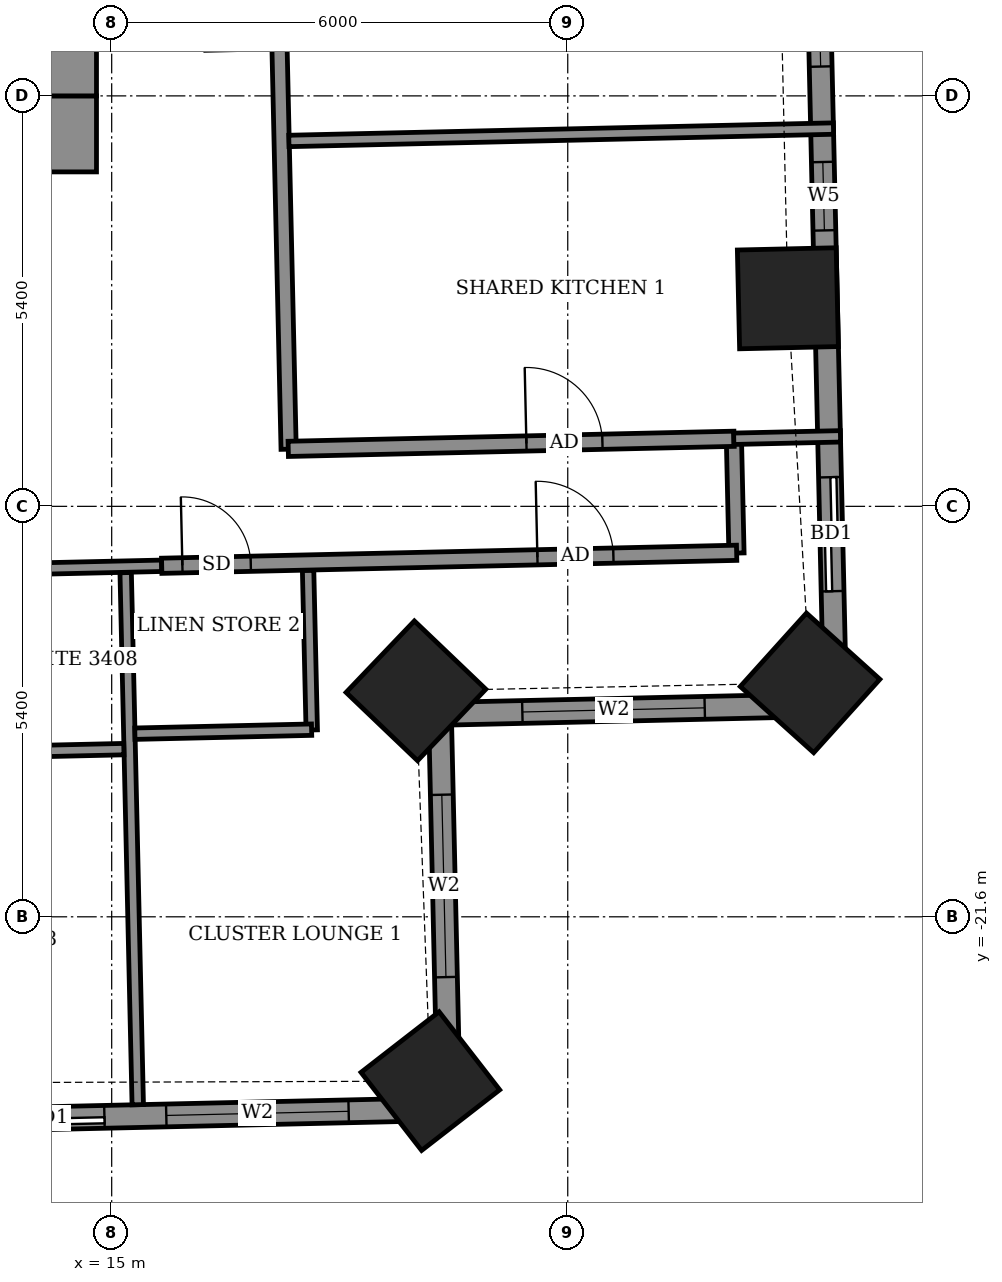
"""IFC4 building model, lengths in metres.
Left out: names, types, materials, properties, quantities, classifications, styles, units other than length and angle.
Written with IfcOpenShell. Run it as: python <this file> out.ifc"""

import sys

from ifc_helpers import new_model, si_unit, direction, frame, frame_2d, origin, origin_2d, place, context, subcontext, project, spatial, rectangle, extrude, element, fill, save


model = new_model("IFC4")
c1 = context("Model", 3, precision=1e-05, world=origin(), true_north=direction((0.0, 1.0)))
c2 = subcontext(c1, "Body", "Model", "MODEL_VIEW")
j1 = project(units=[si_unit("LENGTHUNIT", "METRE"), si_unit("PLANEANGLEUNIT", "RADIAN")], contexts=[c1])
p1 = place(None, origin())
s1 = spatial("IfcSite", under=j1, at=p1, CompositionType="ELEMENT")
p2 = place(p1, origin())
s2 = spatial("IfcBuilding", under=s1, at=p2, CompositionType="ELEMENT")
p3 = place(p2, frame((0.0, 0.0, 137.3)))
s3 = spatial("IfcBuildingStorey", under=s2, at=p3, CompositionType="ELEMENT", Elevation=137.3)
for number, where, z_axis, x_axis in (
    (1, (19.192, -23.761, -0.55), (0.0, 0.0, 1.0), (0.79, 0.613, 0.0)),
    (2, (19.003, -18.627, -0.55), (0.0, 0.0, 1.0), (0.691, 0.723, 0.0)),
    (3, (24.188, -18.523, -0.55), (0.0, 0.0, 1.0), (0.67, 0.743, 0.0)),
    (4, (23.896, -13.463, -0.55), (0.0, 0.0, 1.0), (-0.023, 1.0, 0.0)),
):
    element("IfcColumn", number, at=place(p3, frame(where, z_axis=z_axis, x_axis=x_axis)), inside=s3, PredefinedType="COLUMN", context=c2, shape_type="SweptSolid", body=[
        extrude(rectangle(XDim=1.3, YDim=1.3, at=origin_2d()), origin(), (0.0, 0.0, 1.0), 3.6),
    ])
p4 = place(p3, frame((24.518, -18.812, 0.0), z_axis=(0.0, 0.0, 1.0), x_axis=(-0.02269451316, 0.999742446369, 0.0)))
e5 = element("IfcWall", 5, at=p4, inside=s3, PredefinedType="SOLIDWALL", context=c2, shape_type="SweptSolid", body=[
    extrude(rectangle(XDim=10.93, YDim=0.3, at=frame_2d((5.465, 0.0))), origin(), (0.0, 0.0, 1.0), 3.05),
])
p5 = place(p4, frame((1.496, 0.0, 0.0)))
e6 = element("IfcOpeningElement", 6, at=p5, cuts=e5, PredefinedType="OPENING", context=c2, shape_type="SweptSolid", body=[
    extrude(rectangle(XDim=1.5, YDim=2.4, at=frame_2d((0.75, 1.2))), frame((0.0, 0.16, 0.0), z_axis=(0.0, -1.0, 0.0), x_axis=(1.0, 0.0, 0.0)), (0.0, 0.0, 1.0), 0.32),
])
p6 = place(p4, frame((6.244, 0.0, 0.9)))
e7 = element("IfcOpeningElement", 7, at=p6, cuts=e5, PredefinedType="OPENING", context=c2, shape_type="SweptSolid", body=[
    extrude(rectangle(XDim=0.9, YDim=1.5, at=frame_2d((0.45, 0.75))), frame((0.0, 0.16, 0.0), z_axis=(0.0, -1.0, 0.0), x_axis=(1.0, 0.0, 0.0)), (0.0, 0.0, 1.0), 0.32),
])
p7 = place(p4, frame((8.4, 0.0, 0.9)))
e8 = element("IfcOpeningElement", 8, at=p7, cuts=e5, PredefinedType="OPENING", context=c2, shape_type="SweptSolid", body=[
    extrude(rectangle(XDim=1.2, YDim=1.5, at=frame_2d((0.6, 0.75))), frame((0.0, 0.16, 0.0), z_axis=(0.0, -1.0, 0.0), x_axis=(1.0, 0.0, 0.0)), (0.0, 0.0, 1.0), 0.32),
])
p8 = place(p3, frame((-22.396, -25.078, 0.0), z_axis=(0.0, 0.0, 1.0), x_axis=(0.99974279854, 0.022678993965, 0.0)))
e9 = element("IfcWall", 9, at=p8, inside=s3, PredefinedType="SOLIDWALL", context=c2, shape_type="SweptSolid", body=[
    extrude(rectangle(XDim=41.844, YDim=0.3, at=frame_2d((20.922, 0.0))), origin(), (0.0, 0.0, 1.0), 3.05),
])
p9 = place(p8, frame((1.696, 0.0, 0.0)))
e10 = element("IfcOpeningElement", 10, at=p9, cuts=e9, PredefinedType="OPENING", context=c2, shape_type="SweptSolid", body=[
    extrude(rectangle(XDim=1.5, YDim=2.4, at=frame_2d((0.75, 1.2))), frame((0.0, 0.16, 0.0), z_axis=(0.0, -1.0, 0.0), x_axis=(1.0, 0.0, 0.0)), (0.0, 0.0, 1.0), 0.32),
])
p10 = place(p8, frame((4.512, 0.0, 0.0)))
e11 = element("IfcOpeningElement", 11, at=p10, cuts=e9, PredefinedType="OPENING", context=c2, shape_type="SweptSolid", body=[
    extrude(rectangle(XDim=1.5, YDim=2.4, at=frame_2d((0.75, 1.2))), frame((0.0, 0.16, 0.0), z_axis=(0.0, -1.0, 0.0), x_axis=(1.0, 0.0, 0.0)), (0.0, 0.0, 1.0), 0.32),
])
p11 = place(p8, frame((9.625, 0.0, 0.0)))
e12 = element("IfcOpeningElement", 12, at=p11, cuts=e9, PredefinedType="OPENING", context=c2, shape_type="SweptSolid", body=[
    extrude(rectangle(XDim=1.5, YDim=2.4, at=frame_2d((0.75, 1.2))), frame((0.0, 0.16, 0.0), z_axis=(0.0, -1.0, 0.0), x_axis=(1.0, 0.0, 0.0)), (0.0, 0.0, 1.0), 0.32),
])
p12 = place(p8, frame((14.749, 0.0, 0.0)))
e13 = element("IfcOpeningElement", 13, at=p12, cuts=e9, PredefinedType="OPENING", context=c2, shape_type="SweptSolid", body=[
    extrude(rectangle(XDim=1.5, YDim=2.4, at=frame_2d((0.75, 1.2))), frame((0.0, 0.16, 0.0), z_axis=(0.0, -1.0, 0.0), x_axis=(1.0, 0.0, 0.0)), (0.0, 0.0, 1.0), 0.32),
])
p13 = place(p8, frame((17.861, 0.0, 0.0)))
e14 = element("IfcOpeningElement", 14, at=p13, cuts=e9, PredefinedType="OPENING", context=c2, shape_type="SweptSolid", body=[
    extrude(rectangle(XDim=1.5, YDim=2.4, at=frame_2d((0.75, 1.2))), frame((0.0, 0.16, 0.0), z_axis=(0.0, -1.0, 0.0), x_axis=(1.0, 0.0, 0.0)), (0.0, 0.0, 1.0), 0.32),
])
p14 = place(p8, frame((22.486, 0.0, 0.0)))
e15 = element("IfcOpeningElement", 15, at=p14, cuts=e9, PredefinedType="OPENING", context=c2, shape_type="SweptSolid", body=[
    extrude(rectangle(XDim=1.5, YDim=2.4, at=frame_2d((0.75, 1.2))), frame((0.0, 0.16, 0.0), z_axis=(0.0, -1.0, 0.0), x_axis=(1.0, 0.0, 0.0)), (0.0, 0.0, 1.0), 0.32),
])
p15 = place(p8, frame((25.598, 0.0, 0.0)))
e16 = element("IfcOpeningElement", 16, at=p15, cuts=e9, PredefinedType="OPENING", context=c2, shape_type="SweptSolid", body=[
    extrude(rectangle(XDim=1.5, YDim=2.4, at=frame_2d((0.75, 1.2))), frame((0.0, 0.16, 0.0), z_axis=(0.0, -1.0, 0.0), x_axis=(1.0, 0.0, 0.0)), (0.0, 0.0, 1.0), 0.32),
])
p16 = place(p8, frame((30.7, 0.0, 0.0)))
e17 = element("IfcOpeningElement", 17, at=p16, cuts=e9, PredefinedType="OPENING", context=c2, shape_type="SweptSolid", body=[
    extrude(rectangle(XDim=1.5, YDim=2.4, at=frame_2d((0.75, 1.2))), frame((0.0, 0.16, 0.0), z_axis=(0.0, -1.0, 0.0), x_axis=(1.0, 0.0, 0.0)), (0.0, 0.0, 1.0), 0.32),
])
p17 = place(p8, frame((35.81, 0.0, 0.0)))
e18 = element("IfcOpeningElement", 18, at=p17, cuts=e9, PredefinedType="OPENING", context=c2, shape_type="SweptSolid", body=[
    extrude(rectangle(XDim=1.5, YDim=2.4, at=frame_2d((0.75, 1.2))), frame((0.0, 0.16, 0.0), z_axis=(0.0, -1.0, 0.0), x_axis=(1.0, 0.0, 0.0)), (0.0, 0.0, 1.0), 0.32),
])
p18 = place(p8, frame((38.124, 0.0, 0.9)))
e19 = element("IfcOpeningElement", 19, at=p18, cuts=e9, PredefinedType="OPENING", context=c2, shape_type="SweptSolid", body=[
    extrude(rectangle(XDim=2.4, YDim=1.5, at=frame_2d((1.2, 0.75))), frame((0.0, 0.16, 0.0), z_axis=(0.0, -1.0, 0.0), x_axis=(1.0, 0.0, 0.0)), (0.0, 0.0, 1.0), 0.32),
])
p19 = place(p3, frame((19.437, -24.129, 0.0), z_axis=(0.0, 0.0, 1.0), x_axis=(-0.022675548694, 0.99974287669, 0.0)))
e20 = element("IfcWall", 20, at=p19, inside=s3, PredefinedType="SOLIDWALL", context=c2, shape_type="SweptSolid", body=[
    extrude(rectangle(XDim=5.2, YDim=0.3, at=frame_2d((2.6, 0.0))), origin(), (0.0, 0.0, 1.0), 2.55),
])
p20 = place(p19, frame((1.736, 0.0, 0.9)))
e21 = element("IfcOpeningElement", 21, at=p20, cuts=e20, PredefinedType="OPENING", context=c2, shape_type="SweptSolid", body=[
    extrude(rectangle(XDim=2.4, YDim=1.5, at=frame_2d((1.2, 0.75))), frame((0.0, 0.16, 0.0), z_axis=(0.0, -1.0, 0.0), x_axis=(1.0, 0.0, 0.0)), (0.0, 0.0, 1.0), 0.32),
])
p21 = place(p3, frame((19.319, -18.93, 0.0), z_axis=(0.0, 0.0, 1.0), x_axis=(0.99974287669, 0.022675548694, 0.0)))
e22 = element("IfcWall", 22, at=p21, inside=s3, PredefinedType="SOLIDWALL", context=c2, shape_type="SweptSolid", body=[
    extrude(rectangle(XDim=5.2, YDim=0.3, at=frame_2d((2.6, 0.0))), origin(), (0.0, 0.0, 1.0), 2.55),
])
p22 = place(p21, frame((1.084, 0.0, 0.9)))
e23 = element("IfcOpeningElement", 23, at=p22, cuts=e22, PredefinedType="OPENING", context=c2, shape_type="SweptSolid", body=[
    extrude(rectangle(XDim=2.4, YDim=1.5, at=frame_2d((1.2, 0.75))), frame((0.0, 0.16, 0.0), z_axis=(0.0, -1.0, 0.0), x_axis=(1.0, 0.0, 0.0)), (0.0, 0.0, 1.0), 0.32),
])
p23 = place(p3, frame((15.343, -24.072, 0.0), z_axis=(0.0, 0.0, 1.0), x_axis=(-0.022699227919, 0.999742339331, 0.0)))
e24 = element("IfcWall", 24, at=p23, inside=s3, PredefinedType="PARTITIONING", context=c2, shape_type="SweptSolid", body=[
    extrude(rectangle(XDim=7.002, YDim=0.15, at=frame_2d((3.501, 0.0))), origin(), (0.0, 0.0, 1.0), 2.55),
])
p24 = place(p3, frame((12.835, -19.447, 0.0), z_axis=(0.0, 0.0, 1.0), x_axis=(0.999740478815, 0.022781023197, 0.0)))
e25 = element("IfcWall", 25, at=p24, inside=s3, PredefinedType="PARTITIONING", context=c2, shape_type="SweptSolid", body=[
    extrude(rectangle(XDim=2.325, YDim=0.15, at=frame_2d((1.163, 0.0))), origin(), (0.0, 0.0, 1.0), 3.05),
])
p25 = place(p3, frame((17.632, -19.142, 0.0), z_axis=(0.0, 0.0, 1.0), x_axis=(-0.022906293375, 0.999737616439, 0.0)))
e26 = element("IfcWall", 26, at=p25, inside=s3, PredefinedType="PARTITIONING", context=c2, shape_type="SweptSolid", body=[
    extrude(rectangle(XDim=2.1, YDim=0.15, at=frame_2d((1.05, 0.0))), origin(), (0.0, 0.0, 1.0), 3.05),
])
p26 = place(p3, frame((15.305, -19.191, 0.0), z_axis=(0.0, 0.0, 1.0), x_axis=(0.999740478815, 0.022781023197, 0.0)))
e27 = element("IfcWall", 27, at=p26, inside=s3, PredefinedType="PARTITIONING", context=c2, shape_type="SweptSolid", body=[
    extrude(rectangle(XDim=2.325, YDim=0.15, at=frame_2d((1.163, 0.0))), origin(), (0.0, 0.0, 1.0), 3.05),
])
p27 = place(p3, frame((23.22, -16.815, 0.0), z_axis=(0.0, 0.0, 1.0), x_axis=(-0.022617910375, 0.999744182344, 0.0)))
e28 = element("IfcWall", 28, at=p27, inside=s3, PredefinedType="PARTITIONING", context=c2, shape_type="SweptSolid", body=[
    extrude(rectangle(XDim=1.5, YDim=0.2, at=frame_2d((0.75, 0.0))), origin(), (0.0, 0.0, 1.0), 3.05),
])
p28 = place(p3, frame((-14.871, -17.675, 0.0), z_axis=(0.0, 0.0, 1.0), x_axis=(0.999742359486, 0.02269834024, 0.0)))
e29 = element("IfcWall", 29, at=p28, inside=s3, PredefinedType="PARTITIONING", context=c2, shape_type="SweptSolid", body=[
    extrude(rectangle(XDim=30.536, YDim=0.15, at=frame_2d((15.268, 0.0))), origin(), (0.0, 0.0, 1.0), 3.05),
])
p29 = place(p28, frame((1.034, 0.0, 0.0)))
e30 = element("IfcOpeningElement", 30, at=p29, cuts=e29, PredefinedType="OPENING", context=c2, shape_type="SweptSolid", body=[
    extrude(rectangle(XDim=0.9, YDim=2.1, at=frame_2d((0.45, 1.05))), frame((0.0, 0.085, 0.0), z_axis=(0.0, -1.0, 0.0), x_axis=(1.0, 0.0, 0.0)), (0.0, 0.0, 1.0), 0.17),
])
p30 = place(p28, frame((7.659, 0.0, 0.0)))
e31 = element("IfcOpeningElement", 31, at=p30, cuts=e29, PredefinedType="OPENING", context=c2, shape_type="SweptSolid", body=[
    extrude(rectangle(XDim=0.9, YDim=2.1, at=frame_2d((0.45, 1.05))), frame((0.0, 0.085, 0.0), z_axis=(0.0, -1.0, 0.0), x_axis=(1.0, 0.0, 0.0)), (0.0, 0.0, 1.0), 0.17),
])
p31 = place(p28, frame((9.459, 0.0, 0.0)))
e32 = element("IfcOpeningElement", 32, at=p31, cuts=e29, PredefinedType="OPENING", context=c2, shape_type="SweptSolid", body=[
    extrude(rectangle(XDim=0.9, YDim=2.1, at=frame_2d((0.45, 1.05))), frame((0.0, 0.085, 0.0), z_axis=(0.0, -1.0, 0.0), x_axis=(1.0, 0.0, 0.0)), (0.0, 0.0, 1.0), 0.17),
])
p32 = place(p28, frame((16.084, 0.0, 0.0)))
e33 = element("IfcOpeningElement", 33, at=p32, cuts=e29, PredefinedType="OPENING", context=c2, shape_type="SweptSolid", body=[
    extrude(rectangle(XDim=0.9, YDim=2.1, at=frame_2d((0.45, 1.05))), frame((0.0, 0.085, 0.0), z_axis=(0.0, -1.0, 0.0), x_axis=(1.0, 0.0, 0.0)), (0.0, 0.0, 1.0), 0.17),
])
p33 = place(p28, frame((17.909, 0.0, 0.0)))
e34 = element("IfcOpeningElement", 34, at=p33, cuts=e29, PredefinedType="OPENING", context=c2, shape_type="SweptSolid", body=[
    extrude(rectangle(XDim=0.9, YDim=2.1, at=frame_2d((0.45, 1.05))), frame((0.0, 0.085, 0.0), z_axis=(0.0, -1.0, 0.0), x_axis=(1.0, 0.0, 0.0)), (0.0, 0.0, 1.0), 0.17),
])
p34 = place(p28, frame((24.509, 0.0, 0.0)))
e35 = element("IfcOpeningElement", 35, at=p34, cuts=e29, PredefinedType="OPENING", context=c2, shape_type="SweptSolid", body=[
    extrude(rectangle(XDim=0.9, YDim=2.1, at=frame_2d((0.45, 1.05))), frame((0.0, 0.085, 0.0), z_axis=(0.0, -1.0, 0.0), x_axis=(1.0, 0.0, 0.0)), (0.0, 0.0, 1.0), 0.17),
])
p35 = place(p28, frame((26.309, 0.0, 0.0)))
e36 = element("IfcOpeningElement", 36, at=p35, cuts=e29, PredefinedType="OPENING", context=c2, shape_type="SweptSolid", body=[
    extrude(rectangle(XDim=0.9, YDim=2.1, at=frame_2d((0.45, 1.05))), frame((0.0, 0.085, 0.0), z_axis=(0.0, -1.0, 0.0), x_axis=(1.0, 0.0, 0.0)), (0.0, 0.0, 1.0), 0.17),
])
p36 = place(p3, frame((15.658, -16.982, 0.0), z_axis=(0.0, 0.0, 1.0), x_axis=(0.99974485859, 0.022587999516, 0.0)))
e37 = element("IfcWall", 37, at=p36, inside=s3, PredefinedType="PARTITIONING", context=c2, shape_type="SweptSolid", body=[
    extrude(rectangle(XDim=7.566, YDim=0.2, at=frame_2d((3.783, 0.0))), origin(), (0.0, 0.0, 1.0), 3.05),
])
p37 = place(p36, frame((4.944, 0.0, 0.0)))
e38 = element("IfcOpeningElement", 38, at=p37, cuts=e37, PredefinedType="OPENING", context=c2, shape_type="SweptSolid", body=[
    extrude(rectangle(XDim=1.0, YDim=2.1, at=frame_2d((0.5, 1.05))), frame((0.0, 0.11, 0.0), z_axis=(0.0, -1.0, 0.0), x_axis=(1.0, 0.0, 0.0)), (0.0, 0.0, 1.0), 0.22),
])
p38 = place(p36, frame((0.272, 0.0, 0.0)))
e39 = element("IfcOpeningElement", 39, at=p38, cuts=e37, PredefinedType="OPENING", context=c2, shape_type="SweptSolid", body=[
    extrude(rectangle(XDim=0.9, YDim=2.1, at=frame_2d((0.45, 1.05))), frame((0.0, 0.11, 0.0), z_axis=(0.0, -1.0, 0.0), x_axis=(1.0, 0.0, 0.0)), (0.0, 0.0, 1.0), 0.22),
])
p39 = place(p3, frame((17.328, -15.448, 0.0), z_axis=(0.0, 0.0, 1.0), x_axis=(-0.022680883318, 0.999742755679, 0.0)))
e40 = element("IfcWall", 40, at=p39, inside=s3, PredefinedType="PARTITIONING", context=c2, shape_type="SweptSolid", body=[
    extrude(rectangle(XDim=7.664, YDim=0.2, at=frame_2d((3.832, 0.0))), origin(), (0.0, 0.0, 1.0), 3.05),
])
p40 = place(p39, frame((5.255, 0.0, 0.0)))
e41 = element("IfcOpeningElement", 41, at=p40, cuts=e40, PredefinedType="OPENING", context=c2, shape_type="SweptSolid", body=[
    extrude(rectangle(XDim=1.0, YDim=2.1, at=frame_2d((0.5, 1.05))), frame((0.0, 0.11, 0.0), z_axis=(0.0, -1.0, 0.0), x_axis=(1.0, 0.0, 0.0)), (0.0, 0.0, 1.0), 0.22),
])
p41 = place(p3, frame((17.323, -15.444, 0.0), z_axis=(0.0, 0.0, 1.0), x_axis=(0.999742758565, 0.022680756085, 0.0)))
e42 = element("IfcWall", 42, at=p41, inside=s3, PredefinedType="PARTITIONING", context=c2, shape_type="SweptSolid", body=[
    extrude(rectangle(XDim=5.866, YDim=0.2, at=frame_2d((2.933, 0.0))), origin(), (0.0, 0.0, 1.0), 3.05),
])
p42 = place(p41, frame((3.134, 0.0, 0.0)))
e43 = element("IfcOpeningElement", 43, at=p42, cuts=e42, PredefinedType="OPENING", context=c2, shape_type="SweptSolid", body=[
    extrude(rectangle(XDim=1.0, YDim=2.1, at=frame_2d((0.5, 1.05))), frame((0.0, 0.11, 0.0), z_axis=(0.0, -1.0, 0.0), x_axis=(1.0, 0.0, 0.0)), (0.0, 0.0, 1.0), 0.22),
])
p43 = place(p3, frame((23.184, -15.311, 0.0), z_axis=(0.0, 0.0, 1.0), x_axis=(0.999740577356, 0.022776698371, 0.0)))
e44 = element("IfcWall", 44, at=p43, inside=s3, PredefinedType="PARTITIONING", context=c2, shape_type="SweptSolid", body=[
    extrude(rectangle(XDim=1.404, YDim=0.15, at=frame_2d((0.702, 0.0))), origin(), (0.0, 0.0, 1.0), 2.55),
])
p44 = place(p3, frame((17.331, -11.393, 0.0), z_axis=(0.0, 0.0, 1.0), x_axis=(0.999741061159, 0.022755452803, 0.0)))
e45 = element("IfcWall", 45, at=p44, inside=s3, PredefinedType="PARTITIONING", context=c2, shape_type="SweptSolid", body=[
    extrude(rectangle(XDim=7.167, YDim=0.15, at=frame_2d((3.583, 0.0))), origin(), (0.0, 0.0, 1.0), 2.55),
])
p45 = place(p3, frame((-14.8, -11.3, 0.0), z_axis=(0.0, 0.0, 1.0), x_axis=(1.0, 0.0, 0.0)))
e46 = element("IfcWall", 46, at=p45, inside=s3, PredefinedType="SHEAR", context=c2, shape_type="SweptSolid", body=[
    extrude(rectangle(XDim=29.6, YDim=1.0, at=frame_2d((14.8, 0.0))), origin(), (0.0, 0.0, 1.0), 3.6),
])
p46 = place(p3, frame((14.3, -10.8, 0.0), z_axis=(0.0, 0.0, 1.0), x_axis=(0.0, 1.0, 0.0)))
e47 = element("IfcWall", 47, at=p46, inside=s3, PredefinedType="SHEAR", context=c2, shape_type="SweptSolid", body=[
    extrude(rectangle(XDim=21.6, YDim=1.0, at=frame_2d((10.8, 0.0))), origin(), (0.0, 0.0, 1.0), 3.6),
])
p47 = place(p46, frame((1.2, 0.0, 0.0)))
e48 = element("IfcOpeningElement", 48, at=p47, cuts=e47, PredefinedType="OPENING", context=c2, shape_type="SweptSolid", body=[
    extrude(rectangle(XDim=1.2, YDim=2.1, at=frame_2d((0.6, 1.05))), frame((0.0, 0.51, 0.0), z_axis=(0.0, -1.0, 0.0), x_axis=(1.0, 0.0, 0.0)), (0.0, 0.0, 1.0), 1.02),
])
p48 = place(p5, origin())
e49 = element("IfcDoor", 49, at=p48, inside=s3, OperationType="SLIDING_TO_LEFT", PredefinedType="DOOR", context=c2, shape_type="SweptSolid", body=[
    extrude(rectangle(XDim=1.5, YDim=2.4, at=frame_2d((0.75, 1.2))), frame((0.0, 0.025, 0.0), z_axis=(0.0, -1.0, 0.0), x_axis=(1.0, 0.0, 0.0)), (0.0, 0.0, 1.0), 0.05),
])
fill(e6, e49)
p49 = place(p6, origin())
e50 = element("IfcWindow", 50, at=p49, inside=s3, PartitioningType="SINGLE_PANEL", PredefinedType="WINDOW", context=c2, shape_type="SweptSolid", body=[
    extrude(rectangle(XDim=0.9, YDim=1.5, at=frame_2d((0.45, 0.75))), frame((0.0, 0.03, 0.0), z_axis=(0.0, -1.0, 0.0), x_axis=(1.0, 0.0, 0.0)), (0.0, 0.0, 1.0), 0.06),
])
fill(e7, e50)
p50 = place(p7, origin())
e51 = element("IfcWindow", 51, at=p50, inside=s3, PartitioningType="SINGLE_PANEL", PredefinedType="WINDOW", context=c2, shape_type="SweptSolid", body=[
    extrude(rectangle(XDim=1.2, YDim=1.5, at=frame_2d((0.6, 0.75))), frame((0.0, 0.03, 0.0), z_axis=(0.0, -1.0, 0.0), x_axis=(1.0, 0.0, 0.0)), (0.0, 0.0, 1.0), 0.06),
])
fill(e8, e51)
p51 = place(p17, origin())
e52 = element("IfcDoor", 52, at=p51, inside=s3, OperationType="SLIDING_TO_LEFT", PredefinedType="DOOR", context=c2, shape_type="SweptSolid", body=[
    extrude(rectangle(XDim=1.5, YDim=2.4, at=frame_2d((0.75, 1.2))), frame((0.0, 0.025, 0.0), z_axis=(0.0, -1.0, 0.0), x_axis=(1.0, 0.0, 0.0)), (0.0, 0.0, 1.0), 0.05),
])
fill(e18, e52)
p52 = place(p18, origin())
e53 = element("IfcWindow", 53, at=p52, inside=s3, PartitioningType="DOUBLE_PANEL_VERTICAL", PredefinedType="WINDOW", context=c2, shape_type="SweptSolid", body=[
    extrude(rectangle(XDim=2.4, YDim=1.5, at=frame_2d((1.2, 0.75))), frame((0.0, 0.03, 0.0), z_axis=(0.0, -1.0, 0.0), x_axis=(1.0, 0.0, 0.0)), (0.0, 0.0, 1.0), 0.06),
])
fill(e19, e53)
p53 = place(p20, origin())
e54 = element("IfcWindow", 54, at=p53, inside=s3, PartitioningType="DOUBLE_PANEL_VERTICAL", PredefinedType="WINDOW", context=c2, shape_type="SweptSolid", body=[
    extrude(rectangle(XDim=2.4, YDim=1.5, at=frame_2d((1.2, 0.75))), frame((0.0, 0.03, 0.0), z_axis=(0.0, -1.0, 0.0), x_axis=(1.0, 0.0, 0.0)), (0.0, 0.0, 1.0), 0.06),
])
fill(e21, e54)
p54 = place(p22, origin())
e55 = element("IfcWindow", 55, at=p54, inside=s3, PartitioningType="DOUBLE_PANEL_VERTICAL", PredefinedType="WINDOW", context=c2, shape_type="SweptSolid", body=[
    extrude(rectangle(XDim=2.4, YDim=1.5, at=frame_2d((1.2, 0.75))), frame((0.0, 0.03, 0.0), z_axis=(0.0, -1.0, 0.0), x_axis=(1.0, 0.0, 0.0)), (0.0, 0.0, 1.0), 0.06),
])
fill(e23, e55)
p55 = place(p37, origin())
e56 = element("IfcDoor", 56, at=p55, inside=s3, OperationType="SINGLE_SWING_RIGHT", PredefinedType="DOOR", context=c2, shape_type="SweptSolid", body=[
    extrude(rectangle(XDim=1.0, YDim=2.1, at=frame_2d((0.5, 1.05))), frame((0.0, 0.025, 0.0), z_axis=(0.0, -1.0, 0.0), x_axis=(1.0, 0.0, 0.0)), (0.0, 0.0, 1.0), 0.05),
])
fill(e38, e56)
p56 = place(p38, origin())
e57 = element("IfcDoor", 57, at=p56, inside=s3, OperationType="SINGLE_SWING_RIGHT", PredefinedType="DOOR", context=c2, shape_type="SweptSolid", body=[
    extrude(rectangle(XDim=0.9, YDim=2.1, at=frame_2d((0.45, 1.05))), frame((0.0, 0.025, 0.0), z_axis=(0.0, -1.0, 0.0), x_axis=(1.0, 0.0, 0.0)), (0.0, 0.0, 1.0), 0.05),
])
fill(e39, e57)
p57 = place(p42, origin())
e58 = element("IfcDoor", 58, at=p57, inside=s3, OperationType="SINGLE_SWING_LEFT", PredefinedType="DOOR", context=c2, shape_type="SweptSolid", body=[
    extrude(rectangle(XDim=1.0, YDim=2.1, at=frame_2d((0.5, 1.05))), frame((0.0, 0.025, 0.0), z_axis=(0.0, -1.0, 0.0), x_axis=(1.0, 0.0, 0.0)), (0.0, 0.0, 1.0), 0.05),
])
fill(e43, e58)
save(model, sys.argv[1])
